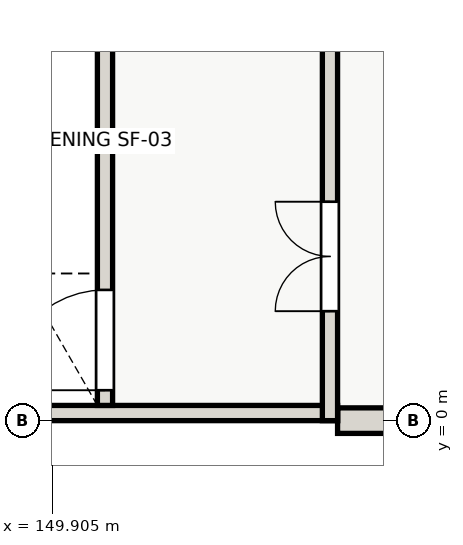
"""IFC4 building model, lengths in metres.
Left out: names, types, materials, properties, quantities, classifications, styles, units other than length and angle.
Written with IfcOpenShell. Run it as: python <this file> out.ifc"""

import sys

from ifc_helpers import new_model, si_unit, direction, frame, frame_2d, origin, place, context, subcontext, project, spatial, rectangle, extrude, element, fill, save


model = new_model("IFC4")
c1 = context("Model", 3, precision=1e-05, world=origin(), true_north=direction((0.0, 1.0)))
c2 = subcontext(c1, "Body", "Model", "MODEL_VIEW")
j1 = project(units=[si_unit("LENGTHUNIT", "METRE"), si_unit("PLANEANGLEUNIT", "RADIAN")], contexts=[c1])
p1 = place(None, origin())
s1 = spatial("IfcSite", under=j1, at=p1, CompositionType="ELEMENT")
p2 = place(p1, origin())
s2 = spatial("IfcBuilding", under=s1, at=p2, CompositionType="ELEMENT")
p3 = place(p2, frame((0.0, 0.0, 4.2)))
s3 = spatial("IfcBuildingStorey", under=s2, at=p3, CompositionType="ELEMENT", Elevation=4.2)
p4 = place(p3, frame((156.0, 0.0, 0.0), z_axis=(0.0, 0.0, 1.0), x_axis=(-1.0, 0.0, 0.0)))
e1 = element("IfcWall", 1, at=p4, inside=s3, PredefinedType="SOLIDWALL", context=c2, shape_type="SweptSolid", body=[
    extrude(rectangle(XDim=1.4, YDim=0.42, at=frame_2d((0.7, 0.0))), origin(), (0.0, 0.0, 1.0), 3.69),
])
p5 = place(p3, frame((154.6, 0.125, 0.0), z_axis=(0.0, 0.0, 1.0), x_axis=(-1.0, 0.0, 0.0)))
e2 = element("IfcWall", 2, at=p5, inside=s3, PredefinedType="SHEAR", context=c2, shape_type="SweptSolid", body=[
    extrude(rectangle(XDim=9.2, YDim=0.25, at=frame_2d((4.6, 0.0))), origin(), (0.0, 0.0, 1.0), 4.2),
])
p6 = place(p3, frame((154.475, 0.0, 0.0), z_axis=(0.0, 0.0, 1.0), x_axis=(0.0, 1.0, 0.0)))
e3 = element("IfcWall", 3, at=p6, inside=s3, PredefinedType="SHEAR", context=c2, shape_type="SweptSolid", body=[
    extrude(rectangle(XDim=9.2, YDim=0.25, at=frame_2d((4.6, 0.0))), origin(), (0.0, 0.0, 1.0), 4.2),
])
p7 = place(p6, frame((1.8, 0.0, 0.0)))
e4 = element("IfcOpeningElement", 4, at=p7, cuts=e3, PredefinedType="OPENING", context=c2, shape_type="SweptSolid", body=[
    extrude(rectangle(XDim=1.8, YDim=2.15, at=frame_2d((0.9, 1.075))), frame((0.0, 0.135, 0.0), z_axis=(0.0, -1.0, 0.0), x_axis=(1.0, 0.0, 0.0)), (0.0, 0.0, 1.0), 0.27),
])
p8 = place(p3, frame((150.775, 0.25, 0.0), z_axis=(0.0, 0.0, 1.0), x_axis=(0.0, 1.0, 0.0)))
e5 = element("IfcWall", 5, at=p8, inside=s3, PredefinedType="SHEAR", context=c2, shape_type="SweptSolid", body=[
    extrude(rectangle(XDim=8.7, YDim=0.25, at=frame_2d((4.35, 0.0))), origin(), (0.0, 0.0, 1.0), 4.2),
])
p9 = place(p8, frame((0.25, 0.0, 0.0)))
e6 = element("IfcOpeningElement", 6, at=p9, cuts=e5, PredefinedType="OPENING", context=c2, shape_type="SweptSolid", body=[
    extrude(rectangle(XDim=1.65, YDim=2.1, at=frame_2d((0.825, 1.05))), frame((0.0, 0.135, 0.0), z_axis=(0.0, -1.0, 0.0), x_axis=(1.0, 0.0, 0.0)), (0.0, 0.0, 1.0), 0.27),
])
p10 = place(p7, origin())
e7 = element("IfcDoor", 7, at=p10, inside=s3, OperationType="DOUBLE_DOOR_SINGLE_SWING", PredefinedType="DOOR", context=c2, shape_type="SweptSolid", body=[
    extrude(rectangle(XDim=1.8, YDim=2.15, at=frame_2d((0.9, 1.075))), frame((0.0, 0.025, 0.0), z_axis=(0.0, -1.0, 0.0), x_axis=(1.0, 0.0, 0.0)), (0.0, 0.0, 1.0), 0.05),
])
fill(e4, e7)
p11 = place(p9, origin())
e8 = element("IfcDoor", 8, at=p11, inside=s3, OperationType="SINGLE_SWING_LEFT", PredefinedType="DOOR", context=c2, shape_type="SweptSolid", body=[
    extrude(rectangle(XDim=1.65, YDim=2.1, at=frame_2d((0.825, 1.05))), frame((0.0, 0.025, 0.0), z_axis=(0.0, -1.0, 0.0), x_axis=(1.0, 0.0, 0.0)), (0.0, 0.0, 1.0), 0.05),
])
fill(e6, e8)
save(model, sys.argv[1])
